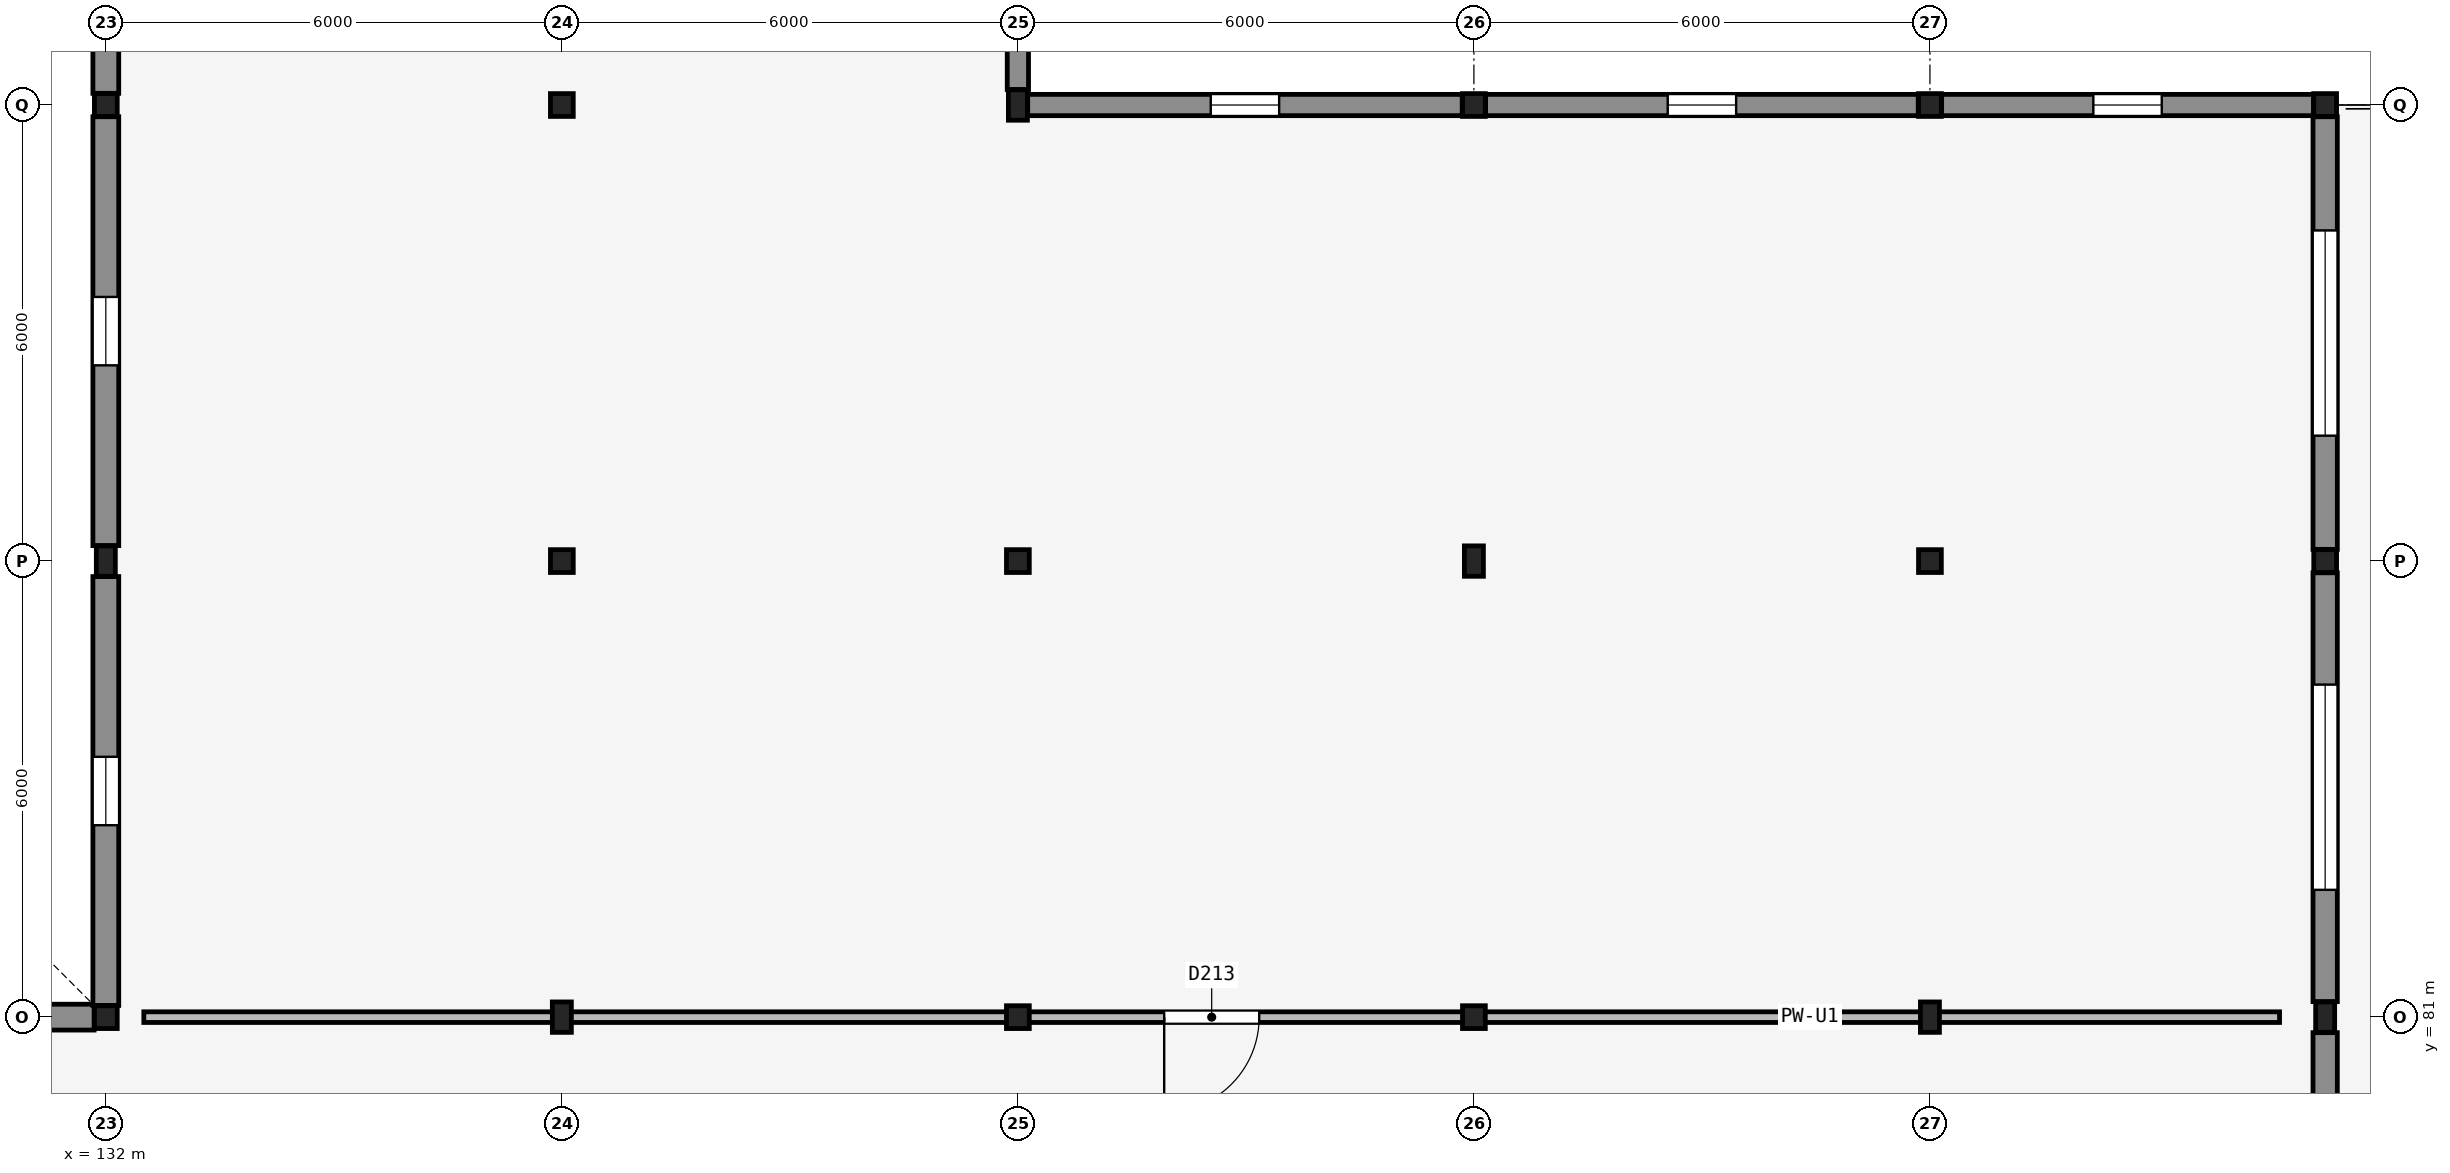
"""IFC4 building model, lengths in metres.
Left out: names, types, materials, properties, quantities, classifications, styles, units other than length and angle.
Written with IfcOpenShell. Run it as: python <this file> out.ifc"""

import sys

from ifc_helpers import new_model, si_unit, direction, frame, frame_2d, origin, origin_2d, place, context, subcontext, project, spatial, rectangle, hollow_rectangle, i_section, extrude, element, fill, save


model = new_model("IFC4")
c1 = context("Model", 3, precision=1e-05, world=origin(), true_north=direction((0.0, 1.0)))
c2 = subcontext(c1, "Body", "Model", "MODEL_VIEW")
j1 = project(units=[si_unit("LENGTHUNIT", "METRE"), si_unit("PLANEANGLEUNIT", "RADIAN")], contexts=[c1])
p1 = place(None, origin())
s1 = spatial("IfcSite", under=j1, at=p1, CompositionType="ELEMENT")
p2 = place(p1, origin())
s2 = spatial("IfcBuilding", under=s1, at=p2, CompositionType="ELEMENT")
p3 = place(p2, frame((0.0, 0.0, 4.8)))
s3 = spatial("IfcBuildingStorey", under=s2, at=p3, CompositionType="ELEMENT", Elevation=4.8)
p4 = place(p3, frame((132.0, 81.0, 0.0), z_axis=(0.0, 0.0, 1.0), x_axis=(1.0, 0.0, 0.0)))
e1 = element("IfcColumn", 1, at=p4, inside=s3, PredefinedType="COLUMN", context=c2, shape_type="SweptSolid", body=[
    extrude(hollow_rectangle(XDim=0.3, YDim=0.3, WallThickness=0.016, InnerFilletRadius=0.016, OuterFilletRadius=0.032, at=origin_2d()), origin(), (0.0, 0.0, 1.0), 4.5),
])
p5 = place(p3, frame((132.0, 87.0, 0.0), z_axis=(0.0, 0.0, 1.0), x_axis=(1.0, 0.0, 0.0)))
e2 = element("IfcColumn", 2, at=p5, inside=s3, PredefinedType="COLUMN", context=c2, shape_type="SweptSolid", body=[
    extrude(i_section(OverallWidth=0.25, OverallDepth=0.4, WebThickness=0.01, FlangeThickness=0.013, FilletRadius=0.014, at=origin_2d()), origin(), (0.0, 0.0, 1.0), 4.5),
])
p6 = place(p3, frame((132.0, 93.0, 0.0), z_axis=(0.0, 0.0, 1.0), x_axis=(1.0, 0.0, 0.0)))
e3 = element("IfcColumn", 3, at=p6, inside=s3, PredefinedType="COLUMN", context=c2, shape_type="SweptSolid", body=[
    extrude(hollow_rectangle(XDim=0.3, YDim=0.3, WallThickness=0.016, InnerFilletRadius=0.016, OuterFilletRadius=0.032, at=origin_2d()), origin(), (0.0, 0.0, 1.0), 4.5),
])
p7 = place(p3, frame((138.0, 81.0, 0.0), z_axis=(0.0, 0.0, 1.0), x_axis=(1.0, 0.0, 0.0)))
e4 = element("IfcColumn", 4, at=p7, inside=s3, PredefinedType="COLUMN", context=c2, shape_type="SweptSolid", body=[
    extrude(i_section(OverallWidth=0.25, OverallDepth=0.4, WebThickness=0.01, FlangeThickness=0.013, FilletRadius=0.014, at=origin_2d()), origin(), (0.0, 0.0, 1.0), 4.5),
])
for number, where, z_axis, x_axis in (
    (5, (138.0, 87.0, 0.0), (0.0, 0.0, 1.0), (1.0, 0.0, 0.0)),
    (6, (138.0, 93.0, 0.0), (0.0, 0.0, 1.0), (1.0, 0.0, 0.0)),
    (7, (144.0, 81.0, 0.0), (0.0, 0.0, 1.0), (1.0, 0.0, 0.0)),
    (8, (144.0, 87.0, 0.0), (0.0, 0.0, 1.0), (1.0, 0.0, 0.0)),
):
    element("IfcColumn", number, at=place(p3, frame(where, z_axis=z_axis, x_axis=x_axis)), inside=s3, PredefinedType="COLUMN", context=c2, shape_type="SweptSolid", body=[
        extrude(hollow_rectangle(XDim=0.3, YDim=0.3, WallThickness=0.016, InnerFilletRadius=0.016, OuterFilletRadius=0.032, at=origin_2d()), origin(), (0.0, 0.0, 1.0), 4.5),
    ])
p8 = place(p3, frame((144.0, 93.0, 0.0), z_axis=(0.0, 0.0, 1.0), x_axis=(1.0, 0.0, 0.0)))
e9 = element("IfcColumn", 9, at=p8, inside=s3, PredefinedType="COLUMN", context=c2, shape_type="SweptSolid", body=[
    extrude(i_section(OverallWidth=0.25, OverallDepth=0.4, WebThickness=0.01, FlangeThickness=0.013, FilletRadius=0.014, at=origin_2d()), origin(), (0.0, 0.0, 1.0), 4.5),
])
p9 = place(p3, frame((150.0, 81.0, 0.0), z_axis=(0.0, 0.0, 1.0), x_axis=(1.0, 0.0, 0.0)))
e10 = element("IfcColumn", 10, at=p9, inside=s3, PredefinedType="COLUMN", context=c2, shape_type="SweptSolid", body=[
    extrude(hollow_rectangle(XDim=0.3, YDim=0.3, WallThickness=0.016, InnerFilletRadius=0.016, OuterFilletRadius=0.032, at=origin_2d()), origin(), (0.0, 0.0, 1.0), 4.5),
])
p10 = place(p3, frame((150.0, 87.0, 0.0), z_axis=(0.0, 0.0, 1.0), x_axis=(1.0, 0.0, 0.0)))
e11 = element("IfcColumn", 11, at=p10, inside=s3, PredefinedType="COLUMN", context=c2, shape_type="SweptSolid", body=[
    extrude(i_section(OverallWidth=0.25, OverallDepth=0.4, WebThickness=0.01, FlangeThickness=0.013, FilletRadius=0.014, at=origin_2d()), origin(), (0.0, 0.0, 1.0), 4.5),
])
p11 = place(p3, frame((150.0, 93.0, 0.0), z_axis=(0.0, 0.0, 1.0), x_axis=(1.0, 0.0, 0.0)))
e12 = element("IfcColumn", 12, at=p11, inside=s3, PredefinedType="COLUMN", context=c2, shape_type="SweptSolid", body=[
    extrude(hollow_rectangle(XDim=0.3, YDim=0.3, WallThickness=0.016, InnerFilletRadius=0.016, OuterFilletRadius=0.032, at=origin_2d()), origin(), (0.0, 0.0, 1.0), 4.5),
])
p12 = place(p3, frame((156.0, 81.0, 0.0), z_axis=(0.0, 0.0, 1.0), x_axis=(1.0, 0.0, 0.0)))
e13 = element("IfcColumn", 13, at=p12, inside=s3, PredefinedType="COLUMN", context=c2, shape_type="SweptSolid", body=[
    extrude(i_section(OverallWidth=0.25, OverallDepth=0.4, WebThickness=0.01, FlangeThickness=0.013, FilletRadius=0.014, at=origin_2d()), origin(), (0.0, 0.0, 1.0), 4.5),
])
for number, where, z_axis, x_axis in (
    (14, (156.0, 87.0, 0.0), (0.0, 0.0, 1.0), (1.0, 0.0, 0.0)),
    (15, (156.0, 93.0, 0.0), (0.0, 0.0, 1.0), (1.0, 0.0, 0.0)),
):
    element("IfcColumn", number, at=place(p3, frame(where, z_axis=z_axis, x_axis=x_axis)), inside=s3, PredefinedType="COLUMN", context=c2, shape_type="SweptSolid", body=[
        extrude(hollow_rectangle(XDim=0.3, YDim=0.3, WallThickness=0.016, InnerFilletRadius=0.016, OuterFilletRadius=0.032, at=origin_2d()), origin(), (0.0, 0.0, 1.0), 4.5),
    ])
p13 = place(p3, frame((161.2, 81.0, 0.0), z_axis=(0.0, 0.0, 1.0), x_axis=(1.0, 0.0, 0.0)))
e16 = element("IfcColumn", 16, at=p13, inside=s3, PredefinedType="COLUMN", context=c2, shape_type="SweptSolid", body=[
    extrude(i_section(OverallWidth=0.25, OverallDepth=0.4, WebThickness=0.01, FlangeThickness=0.013, FilletRadius=0.014, at=origin_2d()), origin(), (0.0, 0.0, 1.0), 4.5),
])
for number, where, z_axis, x_axis in (
    (17, (161.2, 87.0, 0.0), (0.0, 0.0, 1.0), (1.0, 0.0, 0.0)),
    (18, (161.2, 93.0, 0.0), (0.0, 0.0, 1.0), (1.0, 0.0, 0.0)),
):
    element("IfcColumn", number, at=place(p3, frame(where, z_axis=z_axis, x_axis=x_axis)), inside=s3, PredefinedType="COLUMN", context=c2, shape_type="SweptSolid", body=[
        extrude(hollow_rectangle(XDim=0.3, YDim=0.3, WallThickness=0.016, InnerFilletRadius=0.016, OuterFilletRadius=0.032, at=origin_2d()), origin(), (0.0, 0.0, 1.0), 4.5),
    ])
p14 = place(p3, frame((161.2, 75.154, 0.0), z_axis=(0.0, 0.0, 1.0), x_axis=(0.0, 1.0, 0.0)))
e19 = element("IfcWall", 19, at=p14, inside=s3, PredefinedType="SOLIDWALL", context=c2, shape_type="SweptSolid", body=[
    extrude(rectangle(XDim=5.642, YDim=0.32, at=frame_2d((2.821, 0.0))), origin(), (0.0, 0.0, 1.0), 3.69),
])
p15 = place(p14, frame((1.471, 0.0, 0.9)))
e20 = element("IfcOpeningElement", 20, at=p15, cuts=e19, PredefinedType="OPENING", context=c2, shape_type="SweptSolid", body=[
    extrude(rectangle(XDim=2.7, YDim=1.5, at=frame_2d((1.35, 0.75))), frame((0.0, 0.17, 0.0), z_axis=(0.0, -1.0, 0.0), x_axis=(1.0, 0.0, 0.0)), (0.0, 0.0, 1.0), 0.34),
])
p16 = place(p3, frame((161.2, 81.204, 0.0), z_axis=(0.0, 0.0, 1.0), x_axis=(0.0, 1.0, 0.0)))
e21 = element("IfcWall", 21, at=p16, inside=s3, PredefinedType="SOLIDWALL", context=c2, shape_type="SweptSolid", body=[
    extrude(rectangle(XDim=5.642, YDim=0.32, at=frame_2d((2.821, 0.0))), origin(), (0.0, 0.0, 1.0), 3.69),
])
p17 = place(p16, frame((1.471, 0.0, 0.9)))
e22 = element("IfcOpeningElement", 22, at=p17, cuts=e21, PredefinedType="OPENING", context=c2, shape_type="SweptSolid", body=[
    extrude(rectangle(XDim=2.7, YDim=1.5, at=frame_2d((1.35, 0.75))), frame((0.0, 0.17, 0.0), z_axis=(0.0, -1.0, 0.0), x_axis=(1.0, 0.0, 0.0)), (0.0, 0.0, 1.0), 0.34),
])
p18 = place(p3, frame((161.2, 87.154, 0.0), z_axis=(0.0, 0.0, 1.0), x_axis=(0.0, 1.0, 0.0)))
e23 = element("IfcWall", 23, at=p18, inside=s3, PredefinedType="SOLIDWALL", context=c2, shape_type="SweptSolid", body=[
    extrude(rectangle(XDim=5.692, YDim=0.32, at=frame_2d((2.846, 0.0))), origin(), (0.0, 0.0, 1.0), 3.69),
])
p19 = place(p18, frame((1.496, 0.0, 0.9)))
e24 = element("IfcOpeningElement", 24, at=p19, cuts=e23, PredefinedType="OPENING", context=c2, shape_type="SweptSolid", body=[
    extrude(rectangle(XDim=2.7, YDim=1.5, at=frame_2d((1.35, 0.75))), frame((0.0, 0.17, 0.0), z_axis=(0.0, -1.0, 0.0), x_axis=(1.0, 0.0, 0.0)), (0.0, 0.0, 1.0), 0.34),
])
p20 = place(p3, frame((126.154, 81.0, 0.0), z_axis=(0.0, 0.0, 1.0), x_axis=(1.0, 0.0, 0.0)))
e25 = element("IfcWall", 25, at=p20, inside=s3, PredefinedType="SOLIDWALL", context=c2, shape_type="SweptSolid", body=[
    extrude(rectangle(XDim=5.692, YDim=0.34, at=frame_2d((2.846, 0.0))), origin(), (0.0, 0.0, 1.0), 3.59),
])
p21 = place(p20, frame((2.396, 0.0, 1.6)))
e26 = element("IfcOpeningElement", 26, at=p21, cuts=e25, PredefinedType="OPENING", context=c2, shape_type="SweptSolid", body=[
    extrude(rectangle(XDim=0.9, YDim=0.6, at=frame_2d((0.45, 0.3))), frame((0.0, 0.18, 0.0), z_axis=(0.0, -1.0, 0.0), x_axis=(1.0, 0.0, 0.0)), (0.0, 0.0, 1.0), 0.36),
])
p22 = place(p3, frame((132.0, 81.154, 0.0), z_axis=(0.0, 0.0, 1.0), x_axis=(0.0, 1.0, 0.0)))
e27 = element("IfcWall", 27, at=p22, inside=s3, PredefinedType="SOLIDWALL", context=c2, shape_type="SweptSolid", body=[
    extrude(rectangle(XDim=5.642, YDim=0.34, at=frame_2d((2.821, 0.0))), origin(), (0.0, 0.0, 1.0), 3.59),
])
p23 = place(p22, frame((2.371, 0.0, 1.6)))
e28 = element("IfcOpeningElement", 28, at=p23, cuts=e27, PredefinedType="OPENING", context=c2, shape_type="SweptSolid", body=[
    extrude(rectangle(XDim=0.9, YDim=0.6, at=frame_2d((0.45, 0.3))), frame((0.0, 0.18, 0.0), z_axis=(0.0, -1.0, 0.0), x_axis=(1.0, 0.0, 0.0)), (0.0, 0.0, 1.0), 0.36),
])
p24 = place(p3, frame((132.0, 87.204, 0.0), z_axis=(0.0, 0.0, 1.0), x_axis=(0.0, 1.0, 0.0)))
e29 = element("IfcWall", 29, at=p24, inside=s3, PredefinedType="SOLIDWALL", context=c2, shape_type="SweptSolid", body=[
    extrude(rectangle(XDim=5.642, YDim=0.34, at=frame_2d((2.821, 0.0))), origin(), (0.0, 0.0, 1.0), 3.59),
])
p25 = place(p24, frame((2.371, 0.0, 1.6)))
e30 = element("IfcOpeningElement", 30, at=p25, cuts=e29, PredefinedType="OPENING", context=c2, shape_type="SweptSolid", body=[
    extrude(rectangle(XDim=0.9, YDim=0.6, at=frame_2d((0.45, 0.3))), frame((0.0, 0.18, 0.0), z_axis=(0.0, -1.0, 0.0), x_axis=(1.0, 0.0, 0.0)), (0.0, 0.0, 1.0), 0.36),
])
p26 = place(p3, frame((132.0, 93.154, 0.0), z_axis=(0.0, 0.0, 1.0), x_axis=(0.0, 1.0, 0.0)))
e31 = element("IfcWall", 31, at=p26, inside=s3, PredefinedType="SOLIDWALL", context=c2, shape_type="SweptSolid", body=[
    extrude(rectangle(XDim=5.692, YDim=0.34, at=frame_2d((2.846, 0.0))), origin(), (0.0, 0.0, 1.0), 3.59),
])
p27 = place(p26, frame((2.396, 0.0, 1.6)))
e32 = element("IfcOpeningElement", 32, at=p27, cuts=e31, PredefinedType="OPENING", context=c2, shape_type="SweptSolid", body=[
    extrude(rectangle(XDim=0.9, YDim=0.6, at=frame_2d((0.45, 0.3))), frame((0.0, 0.18, 0.0), z_axis=(0.0, -1.0, 0.0), x_axis=(1.0, 0.0, 0.0)), (0.0, 0.0, 1.0), 0.36),
])
p28 = place(p3, frame((144.0, 93.204, 0.0), z_axis=(0.0, 0.0, 1.0), x_axis=(0.0, 1.0, 0.0)))
e33 = element("IfcWall", 33, at=p28, inside=s3, PredefinedType="SOLIDWALL", context=c2, shape_type="SweptSolid", body=[
    extrude(rectangle(XDim=5.642, YDim=0.28, at=frame_2d((2.821, 0.0))), origin(), (0.0, 0.0, 1.0), 3.39),
])
p29 = place(p28, frame((2.371, 0.0, 1.0)))
e34 = element("IfcOpeningElement", 34, at=p29, cuts=e33, PredefinedType="OPENING", context=c2, shape_type="SweptSolid", body=[
    extrude(rectangle(XDim=0.9, YDim=1.5, at=frame_2d((0.45, 0.75))), frame((0.0, 0.15, 0.0), z_axis=(0.0, -1.0, 0.0), x_axis=(1.0, 0.0, 0.0)), (0.0, 0.0, 1.0), 0.3),
])
p30 = place(p3, frame((144.129, 93.0, 0.0), z_axis=(0.0, 0.0, 1.0), x_axis=(1.0, 0.0, 0.0)))
e35 = element("IfcWall", 35, at=p30, inside=s3, PredefinedType="SOLIDWALL", context=c2, shape_type="SweptSolid", body=[
    extrude(rectangle(XDim=5.717, YDim=0.28, at=frame_2d((2.858, 0.0))), origin(), (0.0, 0.0, 1.0), 3.59),
])
p31 = place(p30, frame((2.408, 0.0, 1.0)))
e36 = element("IfcOpeningElement", 36, at=p31, cuts=e35, PredefinedType="OPENING", context=c2, shape_type="SweptSolid", body=[
    extrude(rectangle(XDim=0.9, YDim=1.5, at=frame_2d((0.45, 0.75))), frame((0.0, 0.15, 0.0), z_axis=(0.0, -1.0, 0.0), x_axis=(1.0, 0.0, 0.0)), (0.0, 0.0, 1.0), 0.3),
])
p32 = place(p3, frame((150.154, 93.0, 0.0), z_axis=(0.0, 0.0, 1.0), x_axis=(1.0, 0.0, 0.0)))
e37 = element("IfcWall", 37, at=p32, inside=s3, PredefinedType="SOLIDWALL", context=c2, shape_type="SweptSolid", body=[
    extrude(rectangle(XDim=5.692, YDim=0.28, at=frame_2d((2.846, 0.0))), origin(), (0.0, 0.0, 1.0), 3.59),
])
p33 = place(p32, frame((2.396, 0.0, 1.0)))
e38 = element("IfcOpeningElement", 38, at=p33, cuts=e37, PredefinedType="OPENING", context=c2, shape_type="SweptSolid", body=[
    extrude(rectangle(XDim=0.9, YDim=1.5, at=frame_2d((0.45, 0.75))), frame((0.0, 0.15, 0.0), z_axis=(0.0, -1.0, 0.0), x_axis=(1.0, 0.0, 0.0)), (0.0, 0.0, 1.0), 0.3),
])
p34 = place(p3, frame((156.154, 93.0, 0.0), z_axis=(0.0, 0.0, 1.0), x_axis=(1.0, 0.0, 0.0)))
e39 = element("IfcWall", 39, at=p34, inside=s3, PredefinedType="SOLIDWALL", context=c2, shape_type="SweptSolid", body=[
    extrude(rectangle(XDim=4.892, YDim=0.28, at=frame_2d((2.446, 0.0))), origin(), (0.0, 0.0, 1.0), 3.64),
])
p35 = place(p34, frame((1.996, 0.0, 1.0)))
e40 = element("IfcOpeningElement", 40, at=p35, cuts=e39, PredefinedType="OPENING", context=c2, shape_type="SweptSolid", body=[
    extrude(rectangle(XDim=0.9, YDim=1.5, at=frame_2d((0.45, 0.75))), frame((0.0, 0.15, 0.0), z_axis=(0.0, -1.0, 0.0), x_axis=(1.0, 0.0, 0.0)), (0.0, 0.0, 1.0), 0.3),
])
p36 = place(p3, frame((160.6, 81.0, 0.0), z_axis=(0.0, 0.0, 1.0), x_axis=(-1.0, 0.0, 0.0)))
e41 = element("IfcWall", 41, at=p36, inside=s3, PredefinedType="PARTITIONING", context=c2, shape_type="SweptSolid", body=[
    extrude(rectangle(XDim=28.1, YDim=0.14, at=frame_2d((14.05, 0.0))), origin(), (0.0, 0.0, 1.0), 3.59),
])
p37 = place(p36, frame((13.425, 0.0, 0.0)))
e42 = element("IfcOpeningElement", 42, at=p37, cuts=e41, PredefinedType="OPENING", context=c2, shape_type="SweptSolid", body=[
    extrude(rectangle(XDim=1.25, YDim=2.15, at=frame_2d((0.625, 1.075))), frame((0.0, 0.08, 0.0), z_axis=(0.0, -1.0, 0.0), x_axis=(1.0, 0.0, 0.0)), (0.0, 0.0, 1.0), 0.16),
])
p38 = place(p17, origin())
e43 = element("IfcWindow", 43, at=p38, inside=s3, PartitioningType="SINGLE_PANEL", PredefinedType="WINDOW", context=c2, shape_type="SweptSolid", body=[
    extrude(rectangle(XDim=2.7, YDim=1.5, at=frame_2d((1.35, 0.75))), frame((0.0, 0.03, 0.0), z_axis=(0.0, -1.0, 0.0), x_axis=(1.0, 0.0, 0.0)), (0.0, 0.0, 1.0), 0.06),
])
fill(e22, e43)
p39 = place(p19, origin())
e44 = element("IfcWindow", 44, at=p39, inside=s3, PartitioningType="SINGLE_PANEL", PredefinedType="WINDOW", context=c2, shape_type="SweptSolid", body=[
    extrude(rectangle(XDim=2.7, YDim=1.5, at=frame_2d((1.35, 0.75))), frame((0.0, 0.03, 0.0), z_axis=(0.0, -1.0, 0.0), x_axis=(1.0, 0.0, 0.0)), (0.0, 0.0, 1.0), 0.06),
])
fill(e24, e44)
p40 = place(p23, origin())
e45 = element("IfcWindow", 45, at=p40, inside=s3, PartitioningType="SINGLE_PANEL", PredefinedType="WINDOW", context=c2, shape_type="SweptSolid", body=[
    extrude(rectangle(XDim=0.9, YDim=0.6, at=frame_2d((0.45, 0.3))), frame((0.0, 0.03, 0.0), z_axis=(0.0, -1.0, 0.0), x_axis=(1.0, 0.0, 0.0)), (0.0, 0.0, 1.0), 0.06),
])
fill(e28, e45)
p41 = place(p25, origin())
e46 = element("IfcWindow", 46, at=p41, inside=s3, PartitioningType="SINGLE_PANEL", PredefinedType="WINDOW", context=c2, shape_type="SweptSolid", body=[
    extrude(rectangle(XDim=0.9, YDim=0.6, at=frame_2d((0.45, 0.3))), frame((0.0, 0.03, 0.0), z_axis=(0.0, -1.0, 0.0), x_axis=(1.0, 0.0, 0.0)), (0.0, 0.0, 1.0), 0.06),
])
fill(e30, e46)
p42 = place(p31, origin())
e47 = element("IfcWindow", 47, at=p42, inside=s3, PartitioningType="SINGLE_PANEL", PredefinedType="WINDOW", context=c2, shape_type="SweptSolid", body=[
    extrude(rectangle(XDim=0.9, YDim=1.5, at=frame_2d((0.45, 0.75))), frame((0.0, 0.03, 0.0), z_axis=(0.0, -1.0, 0.0), x_axis=(1.0, 0.0, 0.0)), (0.0, 0.0, 1.0), 0.06),
])
fill(e36, e47)
p43 = place(p33, origin())
e48 = element("IfcWindow", 48, at=p43, inside=s3, PartitioningType="SINGLE_PANEL", PredefinedType="WINDOW", context=c2, shape_type="SweptSolid", body=[
    extrude(rectangle(XDim=0.9, YDim=1.5, at=frame_2d((0.45, 0.75))), frame((0.0, 0.03, 0.0), z_axis=(0.0, -1.0, 0.0), x_axis=(1.0, 0.0, 0.0)), (0.0, 0.0, 1.0), 0.06),
])
fill(e38, e48)
p44 = place(p35, origin())
e49 = element("IfcWindow", 49, at=p44, inside=s3, PartitioningType="SINGLE_PANEL", PredefinedType="WINDOW", context=c2, shape_type="SweptSolid", body=[
    extrude(rectangle(XDim=0.9, YDim=1.5, at=frame_2d((0.45, 0.75))), frame((0.0, 0.03, 0.0), z_axis=(0.0, -1.0, 0.0), x_axis=(1.0, 0.0, 0.0)), (0.0, 0.0, 1.0), 0.06),
])
fill(e40, e49)
p45 = place(p37, origin())
e50 = element("IfcDoor", 50, at=p45, inside=s3, OperationType="SINGLE_SWING_RIGHT", PredefinedType="DOOR", context=c2, shape_type="SweptSolid", body=[
    extrude(rectangle(XDim=1.25, YDim=2.15, at=frame_2d((0.625, 1.075))), frame((0.0, 0.025, 0.0), z_axis=(0.0, -1.0, 0.0), x_axis=(1.0, 0.0, 0.0)), (0.0, 0.0, 1.0), 0.05),
])
fill(e42, e50)
save(model, sys.argv[1])
